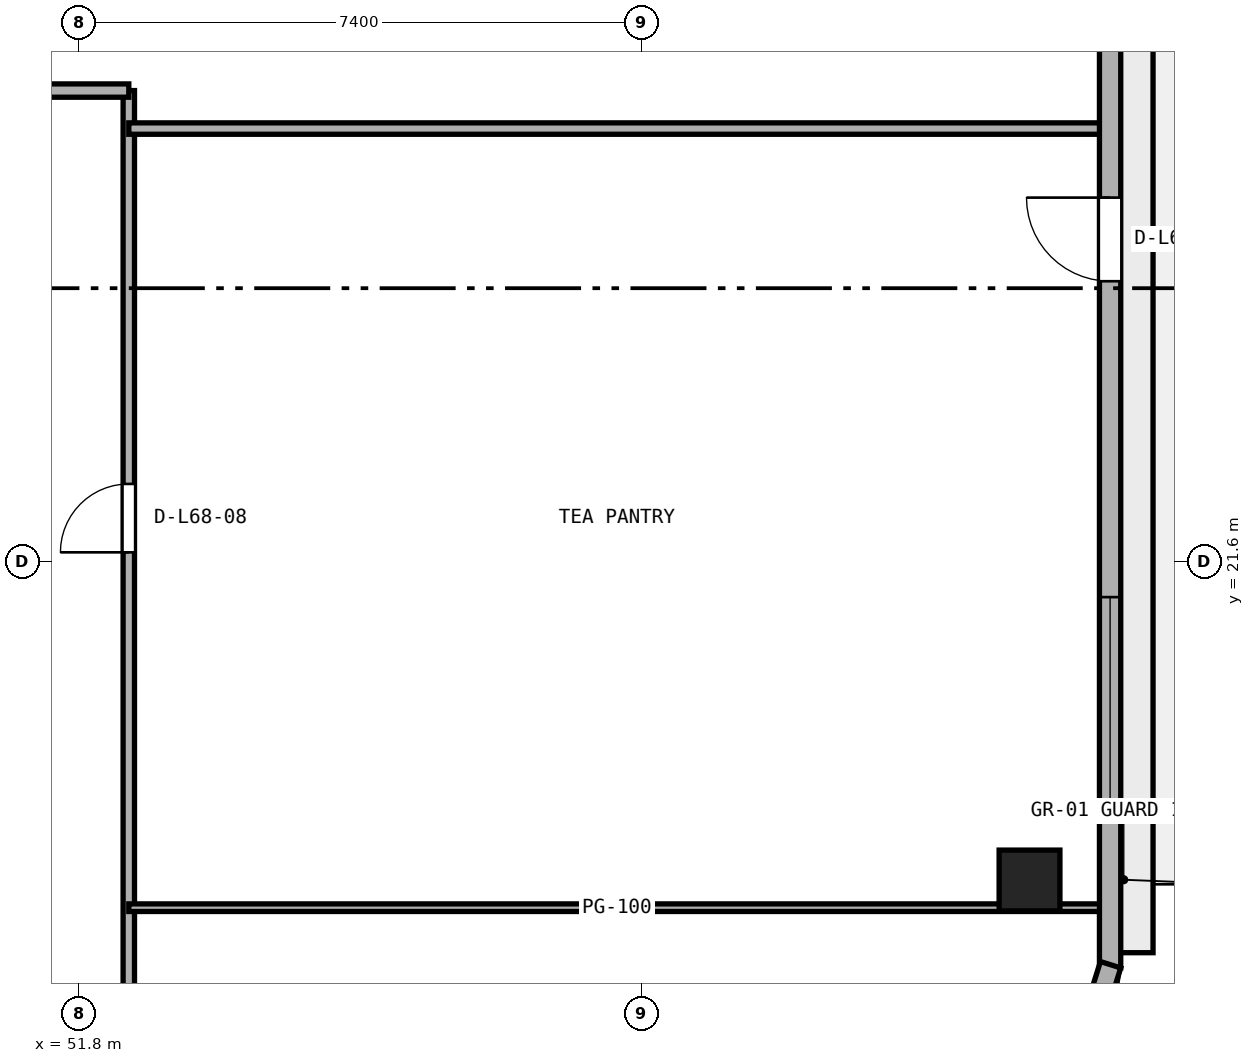
"""IFC4 building model, lengths in metres.
Left out: names, types, materials, properties, quantities, classifications, styles, units other than length and angle.
Written with IfcOpenShell. Run it as: python <this file> out.ifc"""

import sys

from ifc_helpers import new_model, si_unit, direction, frame, frame_2d, origin, origin_2d, place, context, subcontext, project, spatial, rectangle, extrude, element, fill, save


model = new_model("IFC4")
c1 = context("Model", 3, precision=1e-05, world=origin(), true_north=direction((0.0, 1.0)))
c2 = subcontext(c1, "Body", "Model", "MODEL_VIEW")
j1 = project(units=[si_unit("LENGTHUNIT", "METRE"), si_unit("PLANEANGLEUNIT", "RADIAN")], contexts=[c1])
p1 = place(None, origin())
s1 = spatial("IfcSite", under=j1, at=p1, CompositionType="ELEMENT")
p2 = place(p1, origin())
s2 = spatial("IfcBuilding", under=s1, at=p2, CompositionType="ELEMENT")
p3 = place(p2, frame((0.0, 0.0, 266.8)))
s3 = spatial("IfcBuildingStorey", under=s2, at=p3, CompositionType="ELEMENT", Elevation=266.8)
p4 = place(p3, frame((64.3, 17.408, 0.0), z_axis=(0.0, 0.0, 1.0), x_axis=(1.0, 0.0, 0.0)))
e1 = element("IfcColumn", 1, at=p4, inside=s3, PredefinedType="COLUMN", context=c2, shape_type="SweptSolid", body=[
    extrude(rectangle(XDim=0.8, YDim=0.8, at=origin_2d()), origin(), (0.0, 0.0, 1.0), 3.8),
])
p5 = place(p3, frame((52.45, 13.15, 0.0), z_axis=(0.0, 0.0, 1.0), x_axis=(0.0, 1.0, 0.0)))
e2 = element("IfcWall", 2, at=p5, inside=s3, PredefinedType="PARTITIONING", context=c2, shape_type="SweptSolid", body=[
    extrude(rectangle(XDim=14.65, YDim=0.15, at=frame_2d((7.325, 0.0))), origin(), (0.0, 0.0, 1.0), 3.51),
])
p6 = place(p5, frame((8.575, 0.0, 0.0)))
e3 = element("IfcOpeningElement", 3, at=p6, cuts=e2, PredefinedType="OPENING", context=c2, shape_type="SweptSolid", body=[
    extrude(rectangle(XDim=0.9, YDim=2.1, at=frame_2d((0.45, 1.05))), frame((0.0, 0.085, 0.0), z_axis=(0.0, -1.0, 0.0), x_axis=(1.0, 0.0, 0.0)), (0.0, 0.0, 1.0), 0.17),
])
p7 = place(p3, frame((52.45, 17.05, 0.0), z_axis=(0.0, 0.0, 1.0), x_axis=(1.0, 0.0, 0.0)))
e4 = element("IfcWall", 4, at=p7, inside=s3, PredefinedType="PARTITIONING", context=c2, shape_type="SweptSolid", body=[
    extrude(rectangle(XDim=12.845, YDim=0.1, at=frame_2d((6.422, 0.0))), origin(), (0.0, 0.0, 1.0), 3.51),
])
p8 = place(p3, frame((52.45, 27.3, 0.0), z_axis=(0.0, 0.0, 1.0), x_axis=(1.0, 0.0, 0.0)))
e5 = element("IfcWall", 5, at=p8, inside=s3, PredefinedType="PARTITIONING", context=c2, shape_type="SweptSolid", body=[
    extrude(rectangle(XDim=12.845, YDim=0.15, at=frame_2d((6.422, 0.0))), origin(), (0.0, 0.0, 1.0), 3.51),
])
p9 = place(p3, frame((48.74, 27.8, 0.0), z_axis=(0.0, 0.0, 1.0), x_axis=(1.0, 0.0, 0.0)))
e6 = element("IfcWall", 6, at=p9, inside=s3, PredefinedType="PARTITIONING", context=c2, shape_type="SweptSolid", body=[
    extrude(rectangle(XDim=3.71, YDim=0.175, at=frame_2d((1.855, 0.0))), origin(), (0.0, 0.0, 1.0), 3.51),
])
p10 = place(p9, frame((1.405, 0.0, 0.0)))
e7 = element("IfcOpeningElement", 7, at=p10, cuts=e6, PredefinedType="OPENING", context=c2, shape_type="SweptSolid", body=[
    extrude(rectangle(XDim=0.9, YDim=2.1, at=frame_2d((0.45, 1.05))), frame((0.0, 0.097, 0.0), z_axis=(0.0, -1.0, 0.0), x_axis=(1.0, 0.0, 0.0)), (0.0, 0.0, 1.0), 0.195),
])
p11 = place(p3, frame((65.36, 16.258, 0.0), z_axis=(0.0, 0.0, 1.0), x_axis=(0.0, 1.0, 0.0)))
e8 = element("IfcWall", 8, at=p11, inside=s3, PredefinedType="STANDARD", context=c2, shape_type="SweptSolid", body=[
    extrude(rectangle(XDim=19.168, YDim=0.28, at=frame_2d((9.584, 0.0))), origin(), (0.0, 0.0, 1.0), 3.51),
])
p12 = place(p11, frame((9.034, 0.0, 0.0)))
e9 = element("IfcOpeningElement", 9, at=p12, cuts=e8, PredefinedType="OPENING", context=c2, shape_type="SweptSolid", body=[
    extrude(rectangle(XDim=1.1, YDim=2.2, at=frame_2d((0.55, 1.1))), frame((0.0, 0.15, 0.0), z_axis=(0.0, -1.0, 0.0), x_axis=(1.0, 0.0, 0.0)), (0.0, 0.0, 1.0), 0.3),
])
p13 = place(p11, frame((2.178, 0.0, 0.9)))
e10 = element("IfcOpeningElement", 10, at=p13, cuts=e8, PredefinedType="OPENING", context=c2, shape_type="SweptSolid", body=[
    extrude(rectangle(XDim=2.7, YDim=1.75, at=frame_2d((1.35, 0.875))), frame((0.0, 0.15, 0.0), z_axis=(0.0, -1.0, 0.0), x_axis=(1.0, 0.0, 0.0)), (0.0, 0.0, 1.0), 0.3),
])
p14 = place(p11, frame((14.04, 0.0, 0.9)))
e11 = element("IfcOpeningElement", 11, at=p14, cuts=e8, PredefinedType="OPENING", context=c2, shape_type="SweptSolid", body=[
    extrude(rectangle(XDim=2.7, YDim=1.75, at=frame_2d((1.35, 0.875))), frame((0.0, 0.15, 0.0), z_axis=(0.0, -1.0, 0.0), x_axis=(1.0, 0.0, 0.0)), (0.0, 0.0, 1.0), 0.3),
])
p15 = place(p3, frame((64.635, 13.962, 0.0), z_axis=(0.0, 0.0, 1.0), x_axis=(0.298649578722, 0.954362839348, 0.0)))
e12 = element("IfcWall", 12, at=p15, inside=s3, PredefinedType="STANDARD", context=c2, shape_type="SweptSolid", body=[
    extrude(rectangle(XDim=2.449, YDim=0.28, at=frame_2d((1.225, 0.0))), origin(), (0.0, 0.0, 1.0), 3.51),
])
p16 = place(p6, origin())
e13 = element("IfcDoor", 13, at=p16, inside=s3, OperationType="SINGLE_SWING_LEFT", PredefinedType="DOOR", context=c2, shape_type="SweptSolid", body=[
    extrude(rectangle(XDim=0.9, YDim=2.1, at=frame_2d((0.45, 1.05))), frame((0.0, 0.025, 0.0), z_axis=(0.0, -1.0, 0.0), x_axis=(1.0, 0.0, 0.0)), (0.0, 0.0, 1.0), 0.05),
])
fill(e3, e13)
p17 = place(p12, origin())
e14 = element("IfcDoor", 14, at=p17, inside=s3, OperationType="SINGLE_SWING_RIGHT", PredefinedType="DOOR", context=c2, shape_type="SweptSolid", body=[
    extrude(rectangle(XDim=1.1, YDim=2.2, at=frame_2d((0.55, 1.1))), frame((0.0, 0.025, 0.0), z_axis=(0.0, -1.0, 0.0), x_axis=(1.0, 0.0, 0.0)), (0.0, 0.0, 1.0), 0.05),
])
fill(e9, e14)
p18 = place(p13, origin())
e15 = element("IfcWindow", 15, at=p18, inside=s3, PartitioningType="SINGLE_PANEL", PredefinedType="WINDOW", context=c2, shape_type="SweptSolid", body=[
    extrude(rectangle(XDim=2.7, YDim=1.75, at=frame_2d((1.35, 0.875))), frame((0.0, 0.03, 0.0), z_axis=(0.0, -1.0, 0.0), x_axis=(1.0, 0.0, 0.0)), (0.0, 0.0, 1.0), 0.06),
])
fill(e10, e15)
save(model, sys.argv[1])
